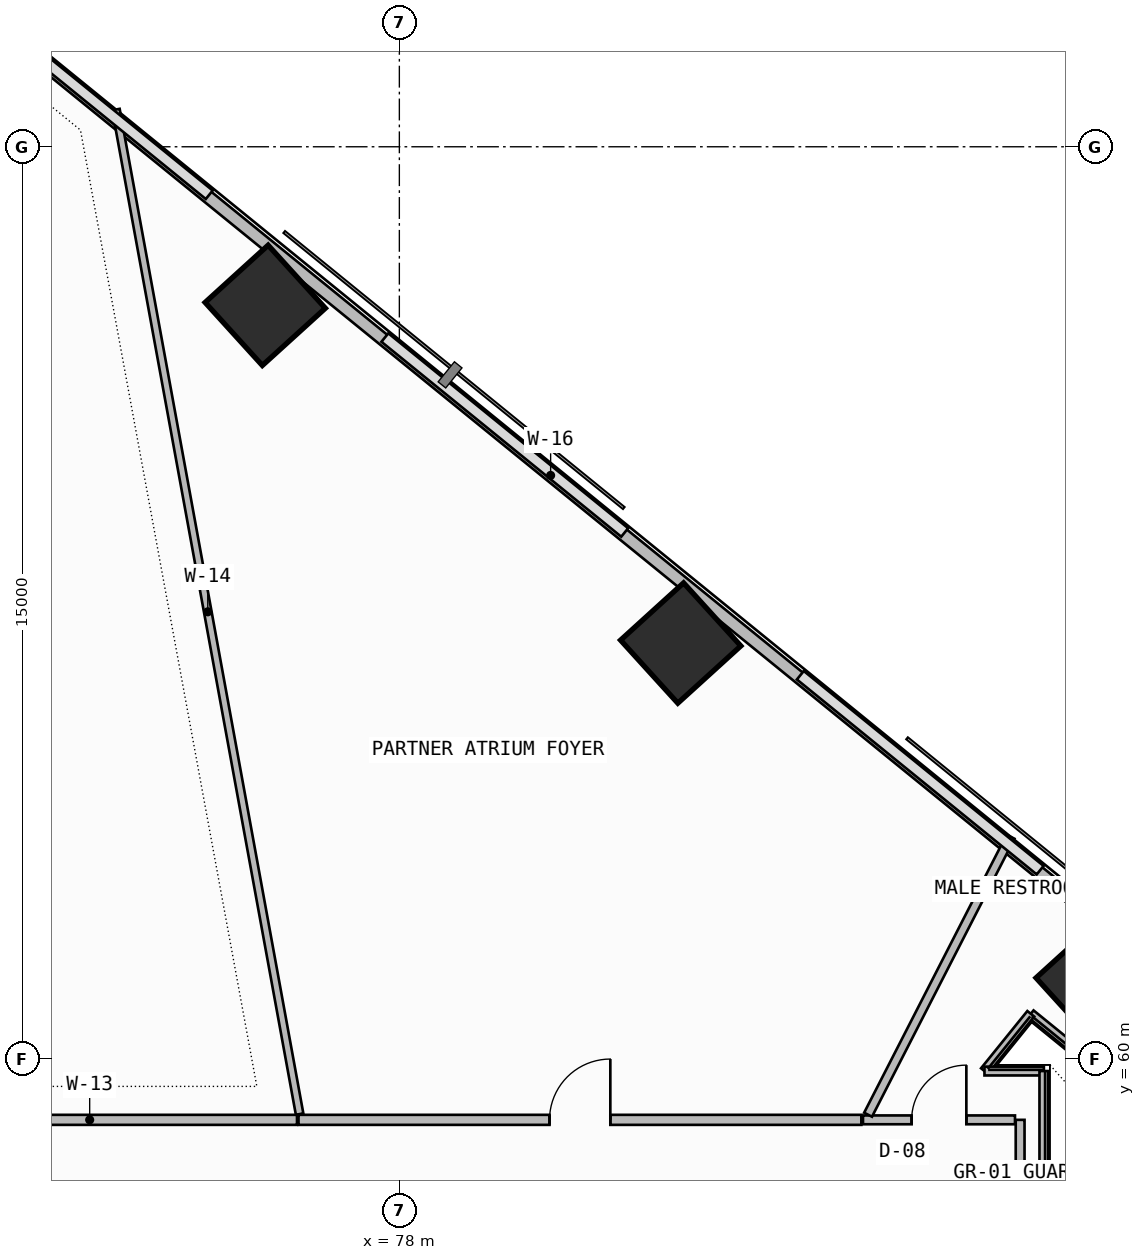
"""IFC4 building model, lengths in metres.
Left out: names, types, materials, properties, quantities, classifications, styles, units other than length and angle.
Written with IfcOpenShell. Run it as: python <this file> out.ifc"""

import sys

from ifc_helpers import new_model, si_unit, direction, frame, frame_2d, origin, origin_2d, place, context, subcontext, project, spatial, rectangle, extrude, element, fill, save


model = new_model("IFC4")
c1 = context("Model", 3, precision=1e-05, world=origin(), true_north=direction((0.0, 1.0)))
c2 = subcontext(c1, "Body", "Model", "MODEL_VIEW")
j1 = project(units=[si_unit("LENGTHUNIT", "METRE"), si_unit("PLANEANGLEUNIT", "RADIAN")], contexts=[c1])
p1 = place(None, origin())
s1 = spatial("IfcSite", under=j1, at=p1, CompositionType="ELEMENT")
p2 = place(p1, origin())
s2 = spatial("IfcBuilding", under=s1, at=p2, CompositionType="ELEMENT")
p3 = place(p2, frame((0.0, 0.0, 30.3)))
s3 = spatial("IfcBuildingStorey", under=s2, at=p3, CompositionType="ELEMENT", Elevation=30.3)
for number, where, z_axis, x_axis in (
    (1, (89.46, 61.285, 0.0), (0.0, 0.0, 1.0), (0.74, 0.672, 0.0)),
    (2, (82.627, 66.839, 0.0), (0.0, 0.0, 1.0), (0.74, 0.672, 0.0)),
    (3, (75.794, 72.392, 0.0), (0.0, 0.0, 1.0), (0.74, 0.672, 0.0)),
):
    element("IfcColumn", number, at=place(p3, frame(where, z_axis=z_axis, x_axis=x_axis)), inside=s3, PredefinedType="COLUMN", context=c2, shape_type="SweptSolid", body=[
        extrude(rectangle(XDim=1.4, YDim=1.4, at=origin_2d()), origin(), (0.0, 0.0, 1.0), 3.6),
    ])
p4 = place(p3, frame((94.513, 58.196, 0.0), z_axis=(0.0, 0.0, 1.0), x_axis=(-0.776001602097, 0.630730935933, 0.0)))
e4 = element("IfcWall", 4, at=p4, inside=s3, PredefinedType="PARAPET", context=c2, shape_type="SweptSolid", body=[
    extrude(rectangle(XDim=36.148, YDim=0.2, at=frame_2d((18.074, 0.0))), origin(), (0.0, 0.0, 1.0), 1.15),
])
p5 = place(p3, frame((88.209, 52.829, 0.0), z_axis=(0.0, 0.0, 1.0), x_axis=(0.0, 1.0, 0.0)))
e5 = element("IfcWall", 5, at=p5, inside=s3, PredefinedType="PARTITIONING", context=c2, shape_type="SweptSolid", body=[
    extrude(rectangle(XDim=6.168, YDim=0.145, at=frame_2d((3.084, 0.0))), origin(), (0.0, 0.0, 1.0), 3.4),
])
p6 = place(p3, frame((88.125, 58.998, 0.0), z_axis=(0.0, 0.0, 1.0), x_axis=(-1.0, 0.0, 0.0)))
e6 = element("IfcWall", 6, at=p6, inside=s3, PredefinedType="PARTITIONING", context=c2, shape_type="SweptSolid", body=[
    extrude(rectangle(XDim=2.5, YDim=0.145, at=frame_2d((1.25, 0.0))), origin(), (0.0, 0.0, 1.0), 3.4),
])
p7 = place(p6, frame((0.8, 0.0, 0.0)))
e7 = element("IfcOpeningElement", 7, at=p7, cuts=e6, PredefinedType="OPENING", context=c2, shape_type="SweptSolid", body=[
    extrude(rectangle(XDim=0.9, YDim=2.1, at=frame_2d((0.45, 1.05))), frame((0.0, 0.083, 0.0), z_axis=(0.0, -1.0, 0.0), x_axis=(1.0, 0.0, 0.0)), (0.0, 0.0, 1.0), 0.165),
])
p8 = place(p3, frame((85.709, 59.082, 0.0), z_axis=(0.0, 0.0, 1.0), x_axis=(0.456087968049, 0.889934697268, 0.0)))
e8 = element("IfcWall", 8, at=p8, inside=s3, PredefinedType="PARTITIONING", context=c2, shape_type="SweptSolid", body=[
    extrude(rectangle(XDim=5.137, YDim=0.145, at=frame_2d((2.569, 0.0))), origin(), (0.0, 0.0, 1.0), 2.785),
])
p9 = place(p3, frame((85.598, 58.998, 0.0), z_axis=(0.0, 0.0, 1.0), x_axis=(-1.0, 0.0, 0.0)))
e9 = element("IfcWall", 9, at=p9, inside=s3, PredefinedType="PARTITIONING", context=c2, shape_type="SweptSolid", body=[
    extrude(rectangle(XDim=9.257, YDim=0.165, at=frame_2d((4.628, 0.0))), origin(), (0.0, 0.0, 1.0), 2.785),
])
p10 = place(p9, frame((4.128, 0.0, 0.0)))
e10 = element("IfcOpeningElement", 10, at=p10, cuts=e9, PredefinedType="OPENING", context=c2, shape_type="SweptSolid", body=[
    extrude(rectangle(XDim=1.0, YDim=2.2, at=frame_2d((0.5, 1.1))), frame((0.0, 0.093, 0.0), z_axis=(0.0, -1.0, 0.0), x_axis=(1.0, 0.0, 0.0)), (0.0, 0.0, 1.0), 0.185),
])
p11 = place(p3, frame((76.36, 59.092, 0.0), z_axis=(0.0, 0.0, 1.0), x_axis=(-0.179880606562, 0.983688450366, 0.0)))
e11 = element("IfcWall", 11, at=p11, inside=s3, PredefinedType="PARTITIONING", context=c2, shape_type="SweptSolid", body=[
    extrude(rectangle(XDim=16.794, YDim=0.125, at=frame_2d((8.397, 0.0))), origin(), (0.0, 0.0, 1.0), 2.785),
])
p12 = place(p3, frame((76.317, 58.998, 0.0), z_axis=(0.0, 0.0, 1.0), x_axis=(-1.0, 0.0, 0.0)))
e12 = element("IfcWall", 12, at=p12, inside=s3, PredefinedType="PARTITIONING", context=c2, shape_type="SweptSolid", body=[
    extrude(rectangle(XDim=6.82, YDim=0.165, at=frame_2d((3.41, 0.0))), origin(), (0.0, 0.0, 1.0), 2.785),
])
p13 = place(p3, frame((92.46, 57.429, 0.0), z_axis=(0.0, 0.0, 1.0), x_axis=(-0.775983159792, 0.630753625213, 0.0)))
e13 = element("IfcWall", 13, at=p13, inside=s3, PredefinedType="PARTITIONING", context=c2, shape_type="SweptSolid", body=[
    extrude(rectangle(XDim=5.252, YDim=0.145, at=frame_2d((2.626, 0.0))), origin(), (0.0, 0.0, 1.0), 3.4),
])
p14 = place(p3, frame((88.385, 60.742, 0.0), z_axis=(0.0, 0.0, 1.0), x_axis=(-0.628914048691, -0.777474835193, 0.0)))
e14 = element("IfcWall", 14, at=p14, inside=s3, PredefinedType="PARTITIONING", context=c2, shape_type="SweptSolid", body=[
    extrude(rectangle(XDim=1.211, YDim=0.145, at=frame_2d((0.605, 0.0))), origin(), (0.0, 0.0, 1.0), 3.4),
])
p15 = place(p3, frame((87.623, 59.8, 0.0), z_axis=(0.0, 0.0, 1.0), x_axis=(1.0, 0.0, 0.0)))
e15 = element("IfcWall", 15, at=p15, inside=s3, PredefinedType="PARTITIONING", context=c2, shape_type="SweptSolid", body=[
    extrude(rectangle(XDim=0.977, YDim=0.145, at=frame_2d((0.489, 0.0))), origin(), (0.0, 0.0, 1.0), 3.4),
])
p16 = place(p3, frame((88.6, 59.8, 0.0), z_axis=(0.0, 0.0, 1.0), x_axis=(0.0, -1.0, 0.0)))
e16 = element("IfcWall", 16, at=p16, inside=s3, PredefinedType="PARTITIONING", context=c2, shape_type="SweptSolid", body=[
    extrude(rectangle(XDim=2.222, YDim=0.145, at=frame_2d((1.111, 0.0))), origin(), (0.0, 0.0, 1.0), 3.4),
])
p17 = place(p7, frame((0.9, 0.0, 0.0), z_axis=(0.0, 0.0, 1.0), x_axis=(-1.0, 0.0, 0.0)))
e17 = element("IfcDoor", 17, at=p17, inside=s3, OperationType="SINGLE_SWING_RIGHT", PredefinedType="DOOR", context=c2, shape_type="SweptSolid", body=[
    extrude(rectangle(XDim=0.9, YDim=2.1, at=frame_2d((0.45, 1.05))), frame((0.0, 0.025, 0.0), z_axis=(0.0, -1.0, 0.0), x_axis=(1.0, 0.0, 0.0)), (0.0, 0.0, 1.0), 0.05),
])
fill(e7, e17)
p18 = place(p10, frame((1.0, 0.0, 0.0), z_axis=(0.0, 0.0, 1.0), x_axis=(-1.0, 0.0, 0.0)))
e18 = element("IfcDoor", 18, at=p18, inside=s3, OperationType="SINGLE_SWING_RIGHT", PredefinedType="DOOR", context=c2, shape_type="SweptSolid", body=[
    extrude(rectangle(XDim=1.0, YDim=2.2, at=frame_2d((0.5, 1.1))), frame((0.0, 0.025, 0.0), z_axis=(0.0, -1.0, 0.0), x_axis=(1.0, 0.0, 0.0)), (0.0, 0.0, 1.0), 0.05),
])
fill(e10, e18)
save(model, sys.argv[1])
